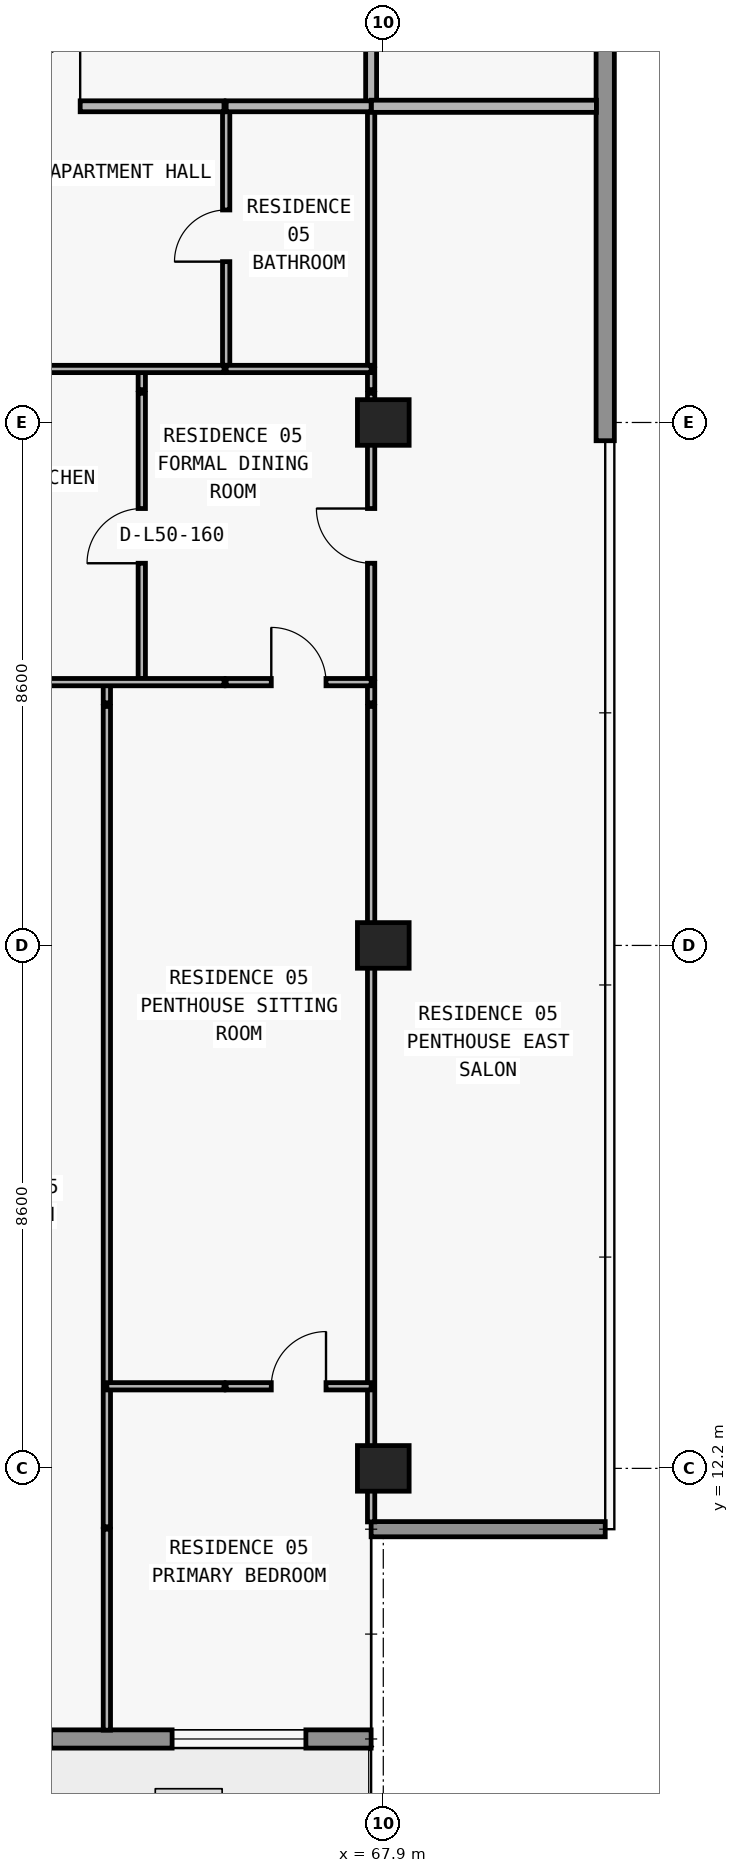
"""IFC4 building model, lengths in metres.
Left out: names, types, materials, properties, quantities, classifications, styles, units other than length and angle.
Written with IfcOpenShell. Run it as: python <this file> out.ifc"""

import sys

from ifc_helpers import new_model, si_unit, direction, frame, frame_2d, origin, origin_2d, place, context, subcontext, project, spatial, rectangle, extrude, element, fill, save


model = new_model("IFC4")
c1 = context("Model", 3, precision=1e-05, world=origin(), true_north=direction((0.0, 1.0)))
c2 = subcontext(c1, "Body", "Model", "MODEL_VIEW")
j1 = project(units=[si_unit("LENGTHUNIT", "METRE"), si_unit("PLANEANGLEUNIT", "RADIAN")], contexts=[c1])
p1 = place(None, origin())
s1 = spatial("IfcSite", under=j1, at=p1, CompositionType="ELEMENT")
p2 = place(p1, origin())
s2 = spatial("IfcBuilding", under=s1, at=p2, CompositionType="ELEMENT")
p3 = place(p2, frame((0.0, 0.0, 180.3)))
s3 = spatial("IfcBuildingStorey", under=s2, at=p3, CompositionType="ELEMENT", Elevation=180.3)
for number, where, z_axis, x_axis in (
    (1, (67.9, 12.2, 0.0), (0.0, 0.0, 1.0), (1.0, 0.0, 0.0)),
    (2, (67.9, 20.8, 0.0), (0.0, 0.0, 1.0), (1.0, 0.0, 0.0)),
    (3, (67.9, 29.4, 0.0), (0.0, 0.0, 1.0), (1.0, 0.0, 0.0)),
):
    element("IfcColumn", number, at=place(p3, frame(where, z_axis=z_axis, x_axis=x_axis)), inside=s3, PredefinedType="COLUMN", context=c2, shape_type="SweptSolid", body=[
        extrude(rectangle(XDim=0.85, YDim=0.75, at=origin_2d()), origin(), (0.0, 0.0, 1.0), 3.0),
    ])
p4 = place(p3, frame((67.7, 7.75, 0.0), z_axis=(0.0, 0.0, 1.0), x_axis=(-1.0, 0.0, 0.0)))
e4 = element("IfcWall", 4, at=p4, inside=s3, PredefinedType="STANDARD", context=c2, shape_type="SweptSolid", body=[
    extrude(rectangle(XDim=57.6, YDim=0.3, at=frame_2d((28.8, 0.0))), origin(), (0.0, 0.0, 1.0), 3.0),
])
p5 = place(p4, frame((54.673, 0.0, 0.0)))
e5 = element("IfcOpeningElement", 5, at=p5, cuts=e4, PredefinedType="OPENING", context=c2, shape_type="SweptSolid", body=[
    extrude(rectangle(XDim=2.0, YDim=2.3, at=frame_2d((1.0, 1.15))), frame((0.0, 0.16, 0.0), z_axis=(0.0, -1.0, 0.0), x_axis=(1.0, 0.0, 0.0)), (0.0, 0.0, 1.0), 0.32),
])
p6 = place(p4, frame((50.473, 0.0, 0.85)))
e6 = element("IfcOpeningElement", 6, at=p6, cuts=e4, PredefinedType="OPENING", context=c2, shape_type="SweptSolid", body=[
    extrude(rectangle(XDim=2.2, YDim=1.55, at=frame_2d((1.1, 0.775))), frame((0.0, 0.16, 0.0), z_axis=(0.0, -1.0, 0.0), x_axis=(1.0, 0.0, 0.0)), (0.0, 0.0, 1.0), 0.32),
])
p7 = place(p4, frame((46.09, 0.0, 0.0)))
e7 = element("IfcOpeningElement", 7, at=p7, cuts=e4, PredefinedType="OPENING", context=c2, shape_type="SweptSolid", body=[
    extrude(rectangle(XDim=2.0, YDim=2.3, at=frame_2d((1.0, 1.15))), frame((0.0, 0.16, 0.0), z_axis=(0.0, -1.0, 0.0), x_axis=(1.0, 0.0, 0.0)), (0.0, 0.0, 1.0), 0.32),
])
p8 = place(p4, frame((41.99, 0.0, 0.85)))
e8 = element("IfcOpeningElement", 8, at=p8, cuts=e4, PredefinedType="OPENING", context=c2, shape_type="SweptSolid", body=[
    extrude(rectangle(XDim=1.8, YDim=1.55, at=frame_2d((0.9, 0.775))), frame((0.0, 0.16, 0.0), z_axis=(0.0, -1.0, 0.0), x_axis=(1.0, 0.0, 0.0)), (0.0, 0.0, 1.0), 0.32),
])
p9 = place(p4, frame((38.09, 0.0, 0.0)))
e9 = element("IfcOpeningElement", 9, at=p9, cuts=e4, PredefinedType="OPENING", context=c2, shape_type="SweptSolid", body=[
    extrude(rectangle(XDim=2.0, YDim=2.3, at=frame_2d((1.0, 1.15))), frame((0.0, 0.16, 0.0), z_axis=(0.0, -1.0, 0.0), x_axis=(1.0, 0.0, 0.0)), (0.0, 0.0, 1.0), 0.32),
])
p10 = place(p4, frame((33.41, 0.0, 0.65)))
e10 = element("IfcOpeningElement", 10, at=p10, cuts=e4, PredefinedType="OPENING", context=c2, shape_type="SweptSolid", body=[
    extrude(rectangle(XDim=2.6, YDim=1.85, at=frame_2d((1.3, 0.925))), frame((0.0, 0.16, 0.0), z_axis=(0.0, -1.0, 0.0), x_axis=(1.0, 0.0, 0.0)), (0.0, 0.0, 1.0), 0.32),
])
p11 = place(p4, frame((27.7, 0.0, 0.85)))
e11 = element("IfcOpeningElement", 11, at=p11, cuts=e4, PredefinedType="OPENING", context=c2, shape_type="SweptSolid", body=[
    extrude(rectangle(XDim=2.2, YDim=1.55, at=frame_2d((1.1, 0.775))), frame((0.0, 0.16, 0.0), z_axis=(0.0, -1.0, 0.0), x_axis=(1.0, 0.0, 0.0)), (0.0, 0.0, 1.0), 0.32),
])
p12 = place(p4, frame((19.7, 0.0, 0.85)))
e12 = element("IfcOpeningElement", 12, at=p12, cuts=e4, PredefinedType="OPENING", context=c2, shape_type="SweptSolid", body=[
    extrude(rectangle(XDim=2.2, YDim=1.55, at=frame_2d((1.1, 0.775))), frame((0.0, 0.16, 0.0), z_axis=(0.0, -1.0, 0.0), x_axis=(1.0, 0.0, 0.0)), (0.0, 0.0, 1.0), 0.32),
])
p13 = place(p4, frame((13.29, 0.0, 0.0)))
e13 = element("IfcOpeningElement", 13, at=p13, cuts=e4, PredefinedType="OPENING", context=c2, shape_type="SweptSolid", body=[
    extrude(rectangle(XDim=2.0, YDim=2.3, at=frame_2d((1.0, 1.15))), frame((0.0, 0.16, 0.0), z_axis=(0.0, -1.0, 0.0), x_axis=(1.0, 0.0, 0.0)), (0.0, 0.0, 1.0), 0.32),
])
p14 = place(p4, frame((9.19, 0.0, 0.85)))
e14 = element("IfcOpeningElement", 14, at=p14, cuts=e4, PredefinedType="OPENING", context=c2, shape_type="SweptSolid", body=[
    extrude(rectangle(XDim=1.8, YDim=1.55, at=frame_2d((0.9, 0.775))), frame((0.0, 0.16, 0.0), z_axis=(0.0, -1.0, 0.0), x_axis=(1.0, 0.0, 0.0)), (0.0, 0.0, 1.0), 0.32),
])
p15 = place(p4, frame((5.273, 0.0, 0.0)))
e15 = element("IfcOpeningElement", 15, at=p15, cuts=e4, PredefinedType="OPENING", context=c2, shape_type="SweptSolid", body=[
    extrude(rectangle(XDim=2.0, YDim=2.3, at=frame_2d((1.0, 1.15))), frame((0.0, 0.16, 0.0), z_axis=(0.0, -1.0, 0.0), x_axis=(1.0, 0.0, 0.0)), (0.0, 0.0, 1.0), 0.32),
])
p16 = place(p4, frame((1.073, 0.0, 0.85)))
e16 = element("IfcOpeningElement", 16, at=p16, cuts=e4, PredefinedType="OPENING", context=c2, shape_type="SweptSolid", body=[
    extrude(rectangle(XDim=2.2, YDim=1.55, at=frame_2d((1.1, 0.775))), frame((0.0, 0.16, 0.0), z_axis=(0.0, -1.0, 0.0), x_axis=(1.0, 0.0, 0.0)), (0.0, 0.0, 1.0), 0.32),
])
p17 = place(p3, frame((67.7, 11.2, 0.0), z_axis=(0.0, 0.0, 1.0), x_axis=(1.0, 0.0, 0.0)))
e17 = element("IfcWall", 17, at=p17, inside=s3, PredefinedType="ELEMENTEDWALL", context=c2, shape_type="SweptSolid", body=[
    extrude(rectangle(XDim=3.85, YDim=0.25, at=frame_2d((1.925, 0.0))), origin(), (0.0, 0.0, 1.0), 3.0),
])
p18 = place(p3, frame((71.55, 47.0, 0.0), z_axis=(0.0, 0.0, 1.0), x_axis=(0.0, -1.0, 0.0)))
e18 = element("IfcWall", 18, at=p18, inside=s3, PredefinedType="STANDARD", context=c2, shape_type="SweptSolid", body=[
    extrude(rectangle(XDim=17.9, YDim=0.3, at=frame_2d((8.95, 0.0))), origin(), (0.0, 0.0, 1.0), 3.0),
])
p19 = place(p3, frame((63.354, 7.895, 0.0), z_axis=(0.0, 0.0, 1.0), x_axis=(0.0, 1.0, 0.0)))
e19 = element("IfcWall", 19, at=p19, inside=s3, PredefinedType="PARTITIONING", context=c2, shape_type="SweptSolid", body=[
    extrude(rectangle(XDim=3.305, YDim=0.12, at=frame_2d((1.652, 0.0))), origin(), (0.0, 0.0, 1.0), 3.0),
])
p20 = place(p3, frame((63.354, 11.24, 0.0), z_axis=(0.0, 0.0, 1.0), x_axis=(0.0, 1.0, 0.0)))
e20 = element("IfcWall", 20, at=p20, inside=s3, PredefinedType="PARTITIONING", context=c2, shape_type="SweptSolid", body=[
    extrude(rectangle(XDim=13.49, YDim=0.12, at=frame_2d((6.745, 0.0))), origin(), (0.0, 0.0, 1.0), 3.0),
])
p21 = place(p3, frame((63.354, 24.79, 0.0), z_axis=(0.0, 0.0, 1.0), x_axis=(0.0, 1.0, 0.0)))
e21 = element("IfcWall", 21, at=p21, inside=s3, PredefinedType="PARTITIONING", context=c2, shape_type="SweptSolid", body=[
    extrude(rectangle(XDim=0.34, YDim=0.12, at=frame_2d((0.17, 0.0))), origin(), (0.0, 0.0, 1.0), 3.0),
])
p22 = place(p3, frame((63.928, 25.19, 0.0), z_axis=(0.0, 0.0, 1.0), x_axis=(0.0, 1.0, 0.0)))
e22 = element("IfcWall", 22, at=p22, inside=s3, PredefinedType="PARTITIONING", context=c2, shape_type="SweptSolid", body=[
    extrude(rectangle(XDim=4.69, YDim=0.12, at=frame_2d((2.345, 0.0))), origin(), (0.0, 0.0, 1.0), 3.0),
])
p23 = place(p22, frame((1.895, 0.0, 0.0)))
e23 = element("IfcOpeningElement", 23, at=p23, cuts=e22, PredefinedType="OPENING", context=c2, shape_type="SweptSolid", body=[
    extrude(rectangle(XDim=0.9, YDim=2.15, at=frame_2d((0.45, 1.075))), frame((0.0, 0.07, 0.0), z_axis=(0.0, -1.0, 0.0), x_axis=(1.0, 0.0, 0.0)), (0.0, 0.0, 1.0), 0.14),
])
p24 = place(p3, frame((63.928, 29.94, 0.0), z_axis=(0.0, 0.0, 1.0), x_axis=(0.0, 1.0, 0.0)))
e24 = element("IfcWall", 24, at=p24, inside=s3, PredefinedType="PARTITIONING", context=c2, shape_type="SweptSolid", body=[
    extrude(rectangle(XDim=0.34, YDim=0.12, at=frame_2d((0.17, 0.0))), origin(), (0.0, 0.0, 1.0), 3.0),
])
p25 = place(p3, frame((65.316, 30.34, 0.0), z_axis=(0.0, 0.0, 1.0), x_axis=(0.0, 1.0, 0.0)))
e25 = element("IfcWall", 25, at=p25, inside=s3, PredefinedType="PARTITIONING", context=c2, shape_type="SweptSolid", body=[
    extrude(rectangle(XDim=4.26, YDim=0.12, at=frame_2d((2.13, 0.0))), origin(), (0.0, 0.0, 1.0), 3.0),
])
p26 = place(p25, frame((1.705, 0.0, 0.0)))
e26 = element("IfcOpeningElement", 26, at=p26, cuts=e25, PredefinedType="OPENING", context=c2, shape_type="SweptSolid", body=[
    extrude(rectangle(XDim=0.85, YDim=2.1, at=frame_2d((0.425, 1.05))), frame((0.0, 0.07, 0.0), z_axis=(0.0, -1.0, 0.0), x_axis=(1.0, 0.0, 0.0)), (0.0, 0.0, 1.0), 0.14),
])
p27 = place(p3, frame((67.7, 11.32, 0.0), z_axis=(0.0, 0.0, 1.0), x_axis=(0.0, 1.0, 0.0)))
e27 = element("IfcWall", 27, at=p27, inside=s3, PredefinedType="PARTITIONING", context=c2, shape_type="SweptSolid", body=[
    extrude(rectangle(XDim=13.41, YDim=0.12, at=frame_2d((6.705, 0.0))), origin(), (0.0, 0.0, 1.0), 2.213),
])
p28 = place(p3, frame((67.7, 24.79, 0.0), z_axis=(0.0, 0.0, 1.0), x_axis=(0.0, 1.0, 0.0)))
e28 = element("IfcWall", 28, at=p28, inside=s3, PredefinedType="PARTITIONING", context=c2, shape_type="SweptSolid", body=[
    extrude(rectangle(XDim=0.34, YDim=0.12, at=frame_2d((0.17, 0.0))), origin(), (0.0, 0.0, 1.0), 2.213),
])
p29 = place(p3, frame((67.7, 25.19, 0.0), z_axis=(0.0, 0.0, 1.0), x_axis=(0.0, 1.0, 0.0)))
e29 = element("IfcWall", 29, at=p29, inside=s3, PredefinedType="PARTITIONING", context=c2, shape_type="SweptSolid", body=[
    extrude(rectangle(XDim=4.69, YDim=0.12, at=frame_2d((2.345, 0.0))), origin(), (0.0, 0.0, 1.0), 2.213),
])
p30 = place(p29, frame((1.895, 0.0, 0.0)))
e30 = element("IfcOpeningElement", 30, at=p30, cuts=e29, PredefinedType="OPENING", context=c2, shape_type="SweptSolid", body=[
    extrude(rectangle(XDim=0.9, YDim=2.15, at=frame_2d((0.45, 1.075))), frame((0.0, 0.07, 0.0), z_axis=(0.0, -1.0, 0.0), x_axis=(1.0, 0.0, 0.0)), (0.0, 0.0, 1.0), 0.14),
])
p31 = place(p3, frame((67.7, 29.94, 0.0), z_axis=(0.0, 0.0, 1.0), x_axis=(0.0, 1.0, 0.0)))
e31 = element("IfcWall", 31, at=p31, inside=s3, PredefinedType="PARTITIONING", context=c2, shape_type="SweptSolid", body=[
    extrude(rectangle(XDim=0.34, YDim=0.12, at=frame_2d((0.17, 0.0))), origin(), (0.0, 0.0, 1.0), 2.213),
])
p32 = place(p3, frame((67.7, 30.34, 0.0), z_axis=(0.0, 0.0, 1.0), x_axis=(0.0, 1.0, 0.0)))
e32 = element("IfcWall", 32, at=p32, inside=s3, PredefinedType="PARTITIONING", context=c2, shape_type="SweptSolid", body=[
    extrude(rectangle(XDim=4.26, YDim=0.12, at=frame_2d((2.13, 0.0))), origin(), (0.0, 0.0, 1.0), 2.213),
])
p33 = place(p3, frame((67.7, 34.605, 0.0), z_axis=(0.0, 0.0, 1.0), x_axis=(0.0, 1.0, 0.0)))
e33 = element("IfcWall", 33, at=p33, inside=s3, PredefinedType="PARTITIONING", context=c2, shape_type="SweptSolid", body=[
    extrude(rectangle(XDim=2.345, YDim=0.18, at=frame_2d((1.172, 0.0))), origin(), (0.0, 0.0, 1.0), 2.213),
])
p34 = place(p3, frame((63.354, 13.55, 0.0), z_axis=(0.0, 0.0, 1.0), x_axis=(1.0, 0.0, 0.0)))
e34 = element("IfcWall", 34, at=p34, inside=s3, PredefinedType="PARTITIONING", context=c2, shape_type="SweptSolid", body=[
    extrude(rectangle(XDim=1.926, YDim=0.12, at=frame_2d((0.963, 0.0))), origin(), (0.0, 0.0, 1.0), 3.0),
])
p35 = place(p3, frame((65.316, 13.55, 0.0), z_axis=(0.0, 0.0, 1.0), x_axis=(1.0, 0.0, 0.0)))
e35 = element("IfcWall", 35, at=p35, inside=s3, PredefinedType="PARTITIONING", context=c2, shape_type="SweptSolid", body=[
    extrude(rectangle(XDim=2.384, YDim=0.12, at=frame_2d((1.192, 0.0))), origin(), (0.0, 0.0, 1.0), 3.0),
])
p36 = place(p35, frame((0.742, 0.0, 0.0)))
e36 = element("IfcOpeningElement", 36, at=p36, cuts=e35, PredefinedType="OPENING", context=c2, shape_type="SweptSolid", body=[
    extrude(rectangle(XDim=0.9, YDim=2.15, at=frame_2d((0.45, 1.075))), frame((0.0, 0.07, 0.0), z_axis=(0.0, -1.0, 0.0), x_axis=(1.0, 0.0, 0.0)), (0.0, 0.0, 1.0), 0.14),
])
p37 = place(p3, frame((59.55, 25.13, 0.0), z_axis=(0.0, 0.0, 1.0), x_axis=(1.0, 0.0, 0.0)))
e37 = element("IfcWall", 37, at=p37, inside=s3, PredefinedType="PARTITIONING", context=c2, shape_type="SweptSolid", body=[
    extrude(rectangle(XDim=5.73, YDim=0.12, at=frame_2d((2.865, 0.0))), origin(), (0.0, 0.0, 1.0), 3.0),
])
p38 = place(p37, frame((1.452, 0.0, 0.0)))
e38 = element("IfcOpeningElement", 38, at=p38, cuts=e37, PredefinedType="OPENING", context=c2, shape_type="SweptSolid", body=[
    extrude(rectangle(XDim=0.9, YDim=2.15, at=frame_2d((0.45, 1.075))), frame((0.0, 0.07, 0.0), z_axis=(0.0, -1.0, 0.0), x_axis=(1.0, 0.0, 0.0)), (0.0, 0.0, 1.0), 0.14),
])
p39 = place(p3, frame((65.316, 25.13, 0.0), z_axis=(0.0, 0.0, 1.0), x_axis=(1.0, 0.0, 0.0)))
e39 = element("IfcWall", 39, at=p39, inside=s3, PredefinedType="PARTITIONING", context=c2, shape_type="SweptSolid", body=[
    extrude(rectangle(XDim=2.384, YDim=0.12, at=frame_2d((1.192, 0.0))), origin(), (0.0, 0.0, 1.0), 3.0),
])
p40 = place(p39, frame((0.742, 0.0, 0.0)))
e40 = element("IfcOpeningElement", 40, at=p40, cuts=e39, PredefinedType="OPENING", context=c2, shape_type="SweptSolid", body=[
    extrude(rectangle(XDim=0.9, YDim=2.15, at=frame_2d((0.45, 1.075))), frame((0.0, 0.07, 0.0), z_axis=(0.0, -1.0, 0.0), x_axis=(1.0, 0.0, 0.0)), (0.0, 0.0, 1.0), 0.14),
])
p41 = place(p3, frame((59.55, 30.28, 0.0), z_axis=(0.0, 0.0, 1.0), x_axis=(1.0, 0.0, 0.0)))
e41 = element("IfcWall", 41, at=p41, inside=s3, PredefinedType="PARTITIONING", context=c2, shape_type="SweptSolid", body=[
    extrude(rectangle(XDim=5.73, YDim=0.12, at=frame_2d((2.865, 0.0))), origin(), (0.0, 0.0, 1.0), 3.0),
])
p42 = place(p41, frame((1.739, 0.0, 0.0)))
e42 = element("IfcOpeningElement", 42, at=p42, cuts=e41, PredefinedType="OPENING", context=c2, shape_type="SweptSolid", body=[
    extrude(rectangle(XDim=0.9, YDim=2.15, at=frame_2d((0.45, 1.075))), frame((0.0, 0.07, 0.0), z_axis=(0.0, -1.0, 0.0), x_axis=(1.0, 0.0, 0.0)), (0.0, 0.0, 1.0), 0.14),
])
p43 = place(p3, frame((65.316, 30.28, 0.0), z_axis=(0.0, 0.0, 1.0), x_axis=(1.0, 0.0, 0.0)))
e43 = element("IfcWall", 43, at=p43, inside=s3, PredefinedType="PARTITIONING", context=c2, shape_type="SweptSolid", body=[
    extrude(rectangle(XDim=2.384, YDim=0.12, at=frame_2d((1.192, 0.0))), origin(), (0.0, 0.0, 1.0), 3.0),
])
p44 = place(p3, frame((59.55, 34.6, 0.0), z_axis=(0.0, 0.0, 1.0), x_axis=(1.0, 0.0, 0.0)))
e44 = element("IfcWall", 44, at=p44, inside=s3, PredefinedType="PARTITIONING", context=c2, shape_type="SweptSolid", body=[
    extrude(rectangle(XDim=5.73, YDim=0.18, at=frame_2d((2.865, 0.0))), origin(), (0.0, 0.0, 1.0), 3.0),
])
p45 = place(p44, frame((2.365, 0.0, 0.0)))
e45 = element("IfcOpeningElement", 45, at=p45, cuts=e44, PredefinedType="OPENING", context=c2, shape_type="SweptSolid", body=[
    extrude(rectangle(XDim=1.0, YDim=2.2, at=frame_2d((0.5, 1.1))), frame((0.0, 0.1, 0.0), z_axis=(0.0, -1.0, 0.0), x_axis=(1.0, 0.0, 0.0)), (0.0, 0.0, 1.0), 0.2),
])
p46 = place(p3, frame((65.316, 34.6, 0.0), z_axis=(0.0, 0.0, 1.0), x_axis=(1.0, 0.0, 0.0)))
e46 = element("IfcWall", 46, at=p46, inside=s3, PredefinedType="PARTITIONING", context=c2, shape_type="SweptSolid", body=[
    extrude(rectangle(XDim=2.384, YDim=0.18, at=frame_2d((1.192, 0.0))), origin(), (0.0, 0.0, 1.0), 3.0),
])
p47 = place(p3, frame((67.705, 34.6, 0.0), z_axis=(0.0, 0.0, 1.0), x_axis=(1.0, 0.0, 0.0)))
e47 = element("IfcWall", 47, at=p47, inside=s3, PredefinedType="PARTITIONING", context=c2, shape_type="SweptSolid", body=[
    extrude(rectangle(XDim=3.7, YDim=0.2, at=frame_2d((1.85, 0.0))), origin(), (0.0, 0.0, 1.0), 3.0),
])
p48 = place(p16, origin())
e48 = element("IfcWindow", 48, at=p48, inside=s3, PartitioningType="SINGLE_PANEL", PredefinedType="WINDOW", context=c2, shape_type="SweptSolid", body=[
    extrude(rectangle(XDim=2.2, YDim=1.55, at=frame_2d((1.1, 0.775))), frame((0.0, 0.03, 0.0), z_axis=(0.0, -1.0, 0.0), x_axis=(1.0, 0.0, 0.0)), (0.0, 0.0, 1.0), 0.06),
])
fill(e16, e48)
p49 = place(p45, origin())
e49 = element("IfcDoor", 49, at=p49, inside=s3, OperationType="SINGLE_SWING_RIGHT", PredefinedType="DOOR", context=c2, shape_type="SweptSolid", body=[
    extrude(rectangle(XDim=1.0, YDim=2.2, at=frame_2d((0.5, 1.1))), frame((0.0, 0.025, 0.0), z_axis=(0.0, -1.0, 0.0), x_axis=(1.0, 0.0, 0.0)), (0.0, 0.0, 1.0), 0.05),
])
fill(e45, e49)
p50 = place(p26, origin())
e50 = element("IfcDoor", 50, at=p50, inside=s3, OperationType="SINGLE_SWING_LEFT", PredefinedType="DOOR", context=c2, shape_type="SweptSolid", body=[
    extrude(rectangle(XDim=0.85, YDim=2.1, at=frame_2d((0.425, 1.05))), frame((0.0, 0.025, 0.0), z_axis=(0.0, -1.0, 0.0), x_axis=(1.0, 0.0, 0.0)), (0.0, 0.0, 1.0), 0.05),
])
fill(e26, e50)
p51 = place(p23, origin())
e51 = element("IfcDoor", 51, at=p51, inside=s3, OperationType="SINGLE_SWING_LEFT", PredefinedType="DOOR", context=c2, shape_type="SweptSolid", body=[
    extrude(rectangle(XDim=0.9, YDim=2.15, at=frame_2d((0.45, 1.075))), frame((0.0, 0.025, 0.0), z_axis=(0.0, -1.0, 0.0), x_axis=(1.0, 0.0, 0.0)), (0.0, 0.0, 1.0), 0.05),
])
fill(e23, e51)
p52 = place(p40, origin())
e52 = element("IfcDoor", 52, at=p52, inside=s3, OperationType="SINGLE_SWING_LEFT", PredefinedType="DOOR", context=c2, shape_type="SweptSolid", body=[
    extrude(rectangle(XDim=0.9, YDim=2.15, at=frame_2d((0.45, 1.075))), frame((0.0, 0.025, 0.0), z_axis=(0.0, -1.0, 0.0), x_axis=(1.0, 0.0, 0.0)), (0.0, 0.0, 1.0), 0.05),
])
fill(e40, e52)
p53 = place(p36, origin())
e53 = element("IfcDoor", 53, at=p53, inside=s3, OperationType="SINGLE_SWING_RIGHT", PredefinedType="DOOR", context=c2, shape_type="SweptSolid", body=[
    extrude(rectangle(XDim=0.9, YDim=2.15, at=frame_2d((0.45, 1.075))), frame((0.0, 0.025, 0.0), z_axis=(0.0, -1.0, 0.0), x_axis=(1.0, 0.0, 0.0)), (0.0, 0.0, 1.0), 0.05),
])
fill(e36, e53)
p54 = place(p30, origin())
e54 = element("IfcDoor", 54, at=p54, inside=s3, OperationType="SINGLE_SWING_RIGHT", PredefinedType="DOOR", context=c2, shape_type="SweptSolid", body=[
    extrude(rectangle(XDim=0.9, YDim=2.15, at=frame_2d((0.45, 1.075))), frame((0.0, 0.025, 0.0), z_axis=(0.0, -1.0, 0.0), x_axis=(1.0, 0.0, 0.0)), (0.0, 0.0, 1.0), 0.05),
])
fill(e30, e54)
save(model, sys.argv[1])
